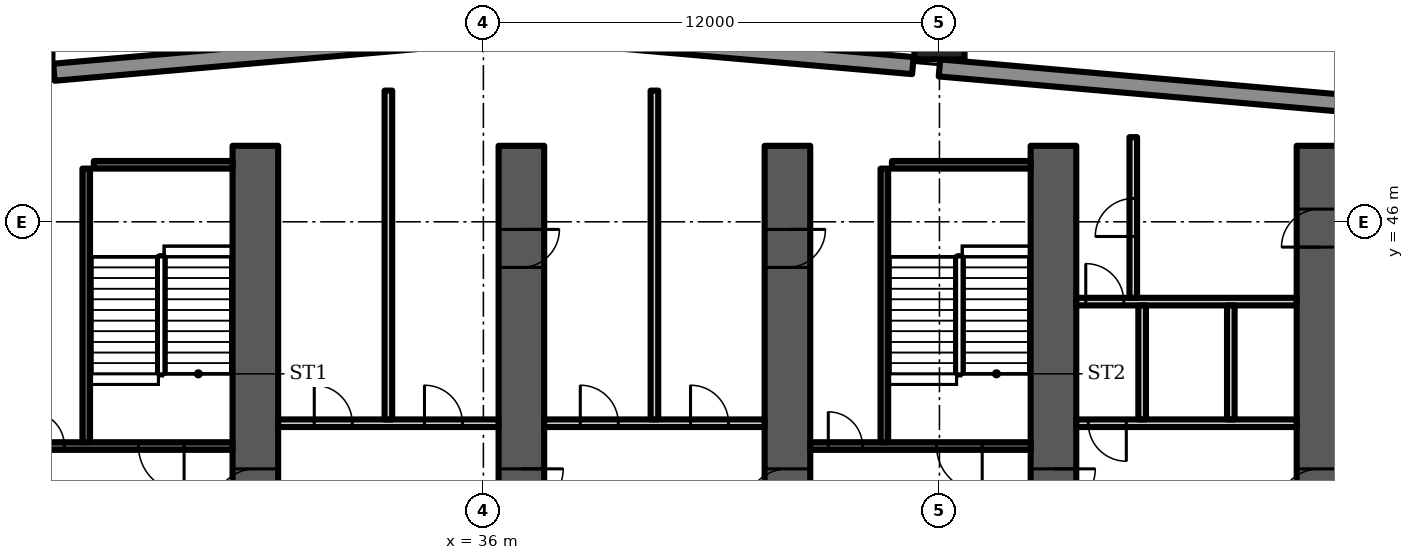
"""IFC4 building model, lengths in metres.
Left out: names, types, materials, properties, quantities, classifications, styles, units other than length and angle.
Written with IfcOpenShell. Run it as: python <this file> out.ifc"""

import sys

from ifc_helpers import new_model, si_unit, direction, frame, frame_2d, origin, origin_2d, place, context, subcontext, project, spatial, polyline, rectangle, outline, extrude, element, fill, save


model = new_model("IFC4")
c1 = context("Model", 3, precision=1e-05, world=origin(), true_north=direction((0.0, 1.0)))
c2 = subcontext(c1, "Body", "Model", "MODEL_VIEW")
j1 = project(units=[si_unit("LENGTHUNIT", "METRE"), si_unit("PLANEANGLEUNIT", "RADIAN")], contexts=[c1])
p1 = place(None, origin())
s1 = spatial("IfcSite", under=j1, at=p1, CompositionType="ELEMENT")
p2 = place(p1, origin())
s2 = spatial("IfcBuilding", under=s1, at=p2, CompositionType="ELEMENT")
p3 = place(p2, frame((0.0, 0.0, 33.0)))
s3 = spatial("IfcBuildingStorey", under=s2, at=p3, CompositionType="ELEMENT", Elevation=33.0)
for number, where, z_axis, x_axis in (
    (1, (24.0, 50.76, 0.0), (0.0, 0.0, 1.0), (1.0, 0.0, 0.0)),
    (2, (48.0, 50.935, 0.0), (0.0, 0.0, 1.0), (1.0, 0.0, 0.0)),
):
    element("IfcColumn", number, at=place(p3, frame(where, z_axis=z_axis, x_axis=x_axis)), inside=s3, PredefinedType="COLUMN", context=c2, shape_type="SweptSolid", body=[
        extrude(rectangle(XDim=1.32, YDim=1.32, at=origin_2d()), origin(), (0.0, 0.0, 1.0), 8.5),
    ])
p4 = place(p3, frame((59.301, 49.06, 0.0), z_axis=(0.0, 0.0, 1.0), x_axis=(-0.996195, 0.087145, 0.0)))
e3 = element("IfcWall", 3, at=p4, inside=s3, PredefinedType="SOLIDWALL", context=c2, shape_type="SweptSolid", body=[
    extrude(rectangle(XDim=11.344, YDim=0.45, at=frame_2d((5.672, 0.0))), origin(), (0.0, 0.0, 1.0), 8.1),
])
p5 = place(p3, frame((47.301, 50.11, 0.0), z_axis=(0.0, 0.0, 1.0), x_axis=(-0.996195, 0.087143, 0.0)))
e4 = element("IfcWall", 4, at=p5, inside=s3, PredefinedType="SOLIDWALL", context=c2, shape_type="SweptSolid", body=[
    extrude(rectangle(XDim=10.26, YDim=0.45, at=frame_2d((5.13, 0.0))), origin(), (0.0, 0.0, 1.0), 8.1),
])
p6 = place(p3, frame((36.0, 50.924, 0.0), z_axis=(0.0, 0.0, 1.0), x_axis=(-0.996195, -0.087145, 0.0)))
e5 = element("IfcWall", 5, at=p6, inside=s3, PredefinedType="SOLIDWALL", context=c2, shape_type="SweptSolid", body=[
    extrude(rectangle(XDim=11.344, YDim=0.45, at=frame_2d((5.672, 0.0))), origin(), (0.0, 0.0, 1.0), 8.1),
])
p7 = place(p3, frame((30.0, 35.2, 0.0), z_axis=(0.0, 0.0, 1.0), x_axis=(0.0, 1.0, 0.0)))
e6 = element("IfcWall", 6, at=p7, inside=s3, PredefinedType="SHEAR", context=c2, shape_type="SweptSolid", body=[
    extrude(rectangle(XDim=12.8, YDim=1.2, at=frame_2d((6.4, 0.0))), origin(), (0.0, 0.0, 1.0), 8.1),
])
p8 = place(p7, frame((3.2, 0.0, 0.0)))
e7 = element("IfcOpeningElement", 7, at=p8, cuts=e6, PredefinedType="OPENING", context=c2, shape_type="SweptSolid", body=[
    extrude(rectangle(XDim=1.1, YDim=2.1, at=frame_2d((0.55, 1.05))), frame((0.0, 0.61, 0.0), z_axis=(0.0, -1.0, 0.0), x_axis=(1.0, 0.0, 0.0)), (0.0, 0.0, 1.0), 1.22),
])
p9 = place(p3, frame((37.0, 35.2, 0.0), z_axis=(0.0, 0.0, 1.0), x_axis=(0.0, 1.0, 0.0)))
e8 = element("IfcWall", 8, at=p9, inside=s3, PredefinedType="SHEAR", context=c2, shape_type="SweptSolid", body=[
    extrude(rectangle(XDim=12.8, YDim=1.2, at=frame_2d((6.4, 0.0))), origin(), (0.0, 0.0, 1.0), 8.1),
])
p10 = place(p9, frame((3.2, 0.0, 0.0)))
e9 = element("IfcOpeningElement", 9, at=p10, cuts=e8, PredefinedType="OPENING", context=c2, shape_type="SweptSolid", body=[
    extrude(rectangle(XDim=1.1, YDim=2.1, at=frame_2d((0.55, 1.05))), frame((0.0, 0.61, 0.0), z_axis=(0.0, -1.0, 0.0), x_axis=(1.0, 0.0, 0.0)), (0.0, 0.0, 1.0), 1.22),
])
p11 = place(p9, frame((9.6, 0.0, 0.0)))
e10 = element("IfcOpeningElement", 10, at=p11, cuts=e8, PredefinedType="OPENING", context=c2, shape_type="SweptSolid", body=[
    extrude(rectangle(XDim=1.0, YDim=2.1, at=frame_2d((0.5, 1.05))), frame((0.0, 0.61, 0.0), z_axis=(0.0, -1.0, 0.0), x_axis=(1.0, 0.0, 0.0)), (0.0, 0.0, 1.0), 1.22),
])
p12 = place(p3, frame((44.0, 35.2, 0.0), z_axis=(0.0, 0.0, 1.0), x_axis=(0.0, 1.0, 0.0)))
e11 = element("IfcWall", 11, at=p12, inside=s3, PredefinedType="SHEAR", context=c2, shape_type="SweptSolid", body=[
    extrude(rectangle(XDim=12.8, YDim=1.2, at=frame_2d((6.4, 0.0))), origin(), (0.0, 0.0, 1.0), 8.1),
])
p13 = place(p12, frame((3.2, 0.0, 0.0)))
e12 = element("IfcOpeningElement", 12, at=p13, cuts=e11, PredefinedType="OPENING", context=c2, shape_type="SweptSolid", body=[
    extrude(rectangle(XDim=1.1, YDim=2.1, at=frame_2d((0.55, 1.05))), frame((0.0, 0.61, 0.0), z_axis=(0.0, -1.0, 0.0), x_axis=(1.0, 0.0, 0.0)), (0.0, 0.0, 1.0), 1.22),
])
p14 = place(p12, frame((9.6, 0.0, 0.0)))
e13 = element("IfcOpeningElement", 13, at=p14, cuts=e11, PredefinedType="OPENING", context=c2, shape_type="SweptSolid", body=[
    extrude(rectangle(XDim=1.0, YDim=2.1, at=frame_2d((0.5, 1.05))), frame((0.0, 0.61, 0.0), z_axis=(0.0, -1.0, 0.0), x_axis=(1.0, 0.0, 0.0)), (0.0, 0.0, 1.0), 1.22),
])
p15 = place(p3, frame((51.0, 35.2, 0.0), z_axis=(0.0, 0.0, 1.0), x_axis=(0.0, 1.0, 0.0)))
e14 = element("IfcWall", 14, at=p15, inside=s3, PredefinedType="SHEAR", context=c2, shape_type="SweptSolid", body=[
    extrude(rectangle(XDim=12.8, YDim=1.2, at=frame_2d((6.4, 0.0))), origin(), (0.0, 0.0, 1.0), 8.1),
])
p16 = place(p15, frame((3.2, 0.0, 0.0)))
e15 = element("IfcOpeningElement", 15, at=p16, cuts=e14, PredefinedType="OPENING", context=c2, shape_type="SweptSolid", body=[
    extrude(rectangle(XDim=1.1, YDim=2.1, at=frame_2d((0.55, 1.05))), frame((0.0, 0.61, 0.0), z_axis=(0.0, -1.0, 0.0), x_axis=(1.0, 0.0, 0.0)), (0.0, 0.0, 1.0), 1.22),
])
p17 = place(p3, frame((58.0, 35.2, 0.0), z_axis=(0.0, 0.0, 1.0), x_axis=(0.0, 1.0, 0.0)))
e16 = element("IfcWall", 16, at=p17, inside=s3, PredefinedType="SHEAR", context=c2, shape_type="SweptSolid", body=[
    extrude(rectangle(XDim=12.8, YDim=1.2, at=frame_2d((6.4, 0.0))), origin(), (0.0, 0.0, 1.0), 8.1),
])
p18 = place(p17, frame((10.134, 0.0, 0.0)))
e17 = element("IfcOpeningElement", 17, at=p18, cuts=e16, PredefinedType="OPENING", context=c2, shape_type="SweptSolid", body=[
    extrude(rectangle(XDim=1.0, YDim=2.1, at=frame_2d((0.5, 1.05))), frame((0.0, 0.61, 0.0), z_axis=(0.0, -1.0, 0.0), x_axis=(1.0, 0.0, 0.0)), (0.0, 0.0, 1.0), 1.22),
])
p19 = place(p17, frame((3.2, 0.0, 0.0)))
e18 = element("IfcOpeningElement", 18, at=p19, cuts=e16, PredefinedType="OPENING", context=c2, shape_type="SweptSolid", body=[
    extrude(rectangle(XDim=1.1, YDim=2.1, at=frame_2d((0.55, 1.05))), frame((0.0, 0.61, 0.0), z_axis=(0.0, -1.0, 0.0), x_axis=(1.0, 0.0, 0.0)), (0.0, 0.0, 1.0), 1.22),
])
p20 = place(p3, frame((23.6, 40.1, 0.0), z_axis=(0.0, 0.0, 1.0), x_axis=(1.0, 0.0, 0.0)))
e19 = element("IfcWall", 19, at=p20, inside=s3, PredefinedType="SHEAR", context=c2, shape_type="SweptSolid", body=[
    extrude(rectangle(XDim=5.8, YDim=0.2, at=frame_2d((2.9, 0.0))), origin(), (0.0, 0.0, 1.0), 8.1),
])
p21 = place(p20, frame((3.325, 0.0, 0.0)))
e20 = element("IfcOpeningElement", 20, at=p21, cuts=e19, PredefinedType="OPENING", context=c2, shape_type="SweptSolid", body=[
    extrude(rectangle(XDim=1.2, YDim=2.1, at=frame_2d((0.6, 1.05))), frame((0.0, 0.11, 0.0), z_axis=(0.0, -1.0, 0.0), x_axis=(1.0, 0.0, 0.0)), (0.0, 0.0, 1.0), 0.22),
])
p22 = place(p20, frame((0.475, 0.0, 0.0)))
e21 = element("IfcOpeningElement", 21, at=p22, cuts=e19, PredefinedType="OPENING", context=c2, shape_type="SweptSolid", body=[
    extrude(rectangle(XDim=0.9, YDim=2.1, at=frame_2d((0.45, 1.05))), frame((0.0, 0.11, 0.0), z_axis=(0.0, -1.0, 0.0), x_axis=(1.0, 0.0, 0.0)), (0.0, 0.0, 1.0), 0.22),
])
p23 = place(p3, frame((25.55, 40.2, 0.0), z_axis=(0.0, 0.0, 1.0), x_axis=(0.0, 1.0, 0.0)))
e22 = element("IfcWall", 22, at=p23, inside=s3, PredefinedType="SHEAR", context=c2, shape_type="SweptSolid", body=[
    extrude(rectangle(XDim=7.2, YDim=0.2, at=frame_2d((3.6, 0.0))), origin(), (0.0, 0.0, 1.0), 8.1),
])
p24 = place(p3, frame((25.75, 47.5, 0.0), z_axis=(0.0, 0.0, 1.0), x_axis=(1.0, 0.0, 0.0)))
e23 = element("IfcWall", 23, at=p24, inside=s3, PredefinedType="SHEAR", context=c2, shape_type="SweptSolid", body=[
    extrude(rectangle(XDim=3.65, YDim=0.2, at=frame_2d((1.825, 0.0))), origin(), (0.0, 0.0, 1.0), 8.1),
])
p25 = place(p3, frame((30.6, 40.7, 0.0), z_axis=(0.0, 0.0, 1.0), x_axis=(1.0, 0.0, 0.0)))
e24 = element("IfcWall", 24, at=p25, inside=s3, PredefinedType="PARTITIONING", context=c2, shape_type="SweptSolid", body=[
    extrude(rectangle(XDim=5.8, YDim=0.2, at=frame_2d((2.9, 0.0))), origin(), (0.0, 0.0, 1.0), 8.1),
])
p26 = place(p25, frame((0.95, 0.0, 0.0)))
e25 = element("IfcOpeningElement", 25, at=p26, cuts=e24, PredefinedType="OPENING", context=c2, shape_type="SweptSolid", body=[
    extrude(rectangle(XDim=1.0, YDim=2.1, at=frame_2d((0.5, 1.05))), frame((0.0, 0.11, 0.0), z_axis=(0.0, -1.0, 0.0), x_axis=(1.0, 0.0, 0.0)), (0.0, 0.0, 1.0), 0.22),
])
p27 = place(p25, frame((3.85, 0.0, 0.0)))
e26 = element("IfcOpeningElement", 26, at=p27, cuts=e24, PredefinedType="OPENING", context=c2, shape_type="SweptSolid", body=[
    extrude(rectangle(XDim=1.0, YDim=2.1, at=frame_2d((0.5, 1.05))), frame((0.0, 0.11, 0.0), z_axis=(0.0, -1.0, 0.0), x_axis=(1.0, 0.0, 0.0)), (0.0, 0.0, 1.0), 0.22),
])
p28 = place(p3, frame((33.5, 40.8, 0.0), z_axis=(0.0, 0.0, 1.0), x_axis=(0.0, 1.0, 0.0)))
e27 = element("IfcWall", 27, at=p28, inside=s3, PredefinedType="PARTITIONING", context=c2, shape_type="SweptSolid", body=[
    extrude(rectangle(XDim=8.653, YDim=0.2, at=frame_2d((4.326, 0.0))), origin(), (0.0, 0.0, 1.0), 8.1),
])
p29 = place(p3, frame((37.6, 40.7, 0.0), z_axis=(0.0, 0.0, 1.0), x_axis=(1.0, 0.0, 0.0)))
e28 = element("IfcWall", 28, at=p29, inside=s3, PredefinedType="PARTITIONING", context=c2, shape_type="SweptSolid", body=[
    extrude(rectangle(XDim=5.8, YDim=0.2, at=frame_2d((2.9, 0.0))), origin(), (0.0, 0.0, 1.0), 8.1),
])
p30 = place(p29, frame((0.95, 0.0, 0.0)))
e29 = element("IfcOpeningElement", 29, at=p30, cuts=e28, PredefinedType="OPENING", context=c2, shape_type="SweptSolid", body=[
    extrude(rectangle(XDim=1.0, YDim=2.1, at=frame_2d((0.5, 1.05))), frame((0.0, 0.11, 0.0), z_axis=(0.0, -1.0, 0.0), x_axis=(1.0, 0.0, 0.0)), (0.0, 0.0, 1.0), 0.22),
])
p31 = place(p29, frame((3.85, 0.0, 0.0)))
e30 = element("IfcOpeningElement", 30, at=p31, cuts=e28, PredefinedType="OPENING", context=c2, shape_type="SweptSolid", body=[
    extrude(rectangle(XDim=1.0, YDim=2.1, at=frame_2d((0.5, 1.05))), frame((0.0, 0.11, 0.0), z_axis=(0.0, -1.0, 0.0), x_axis=(1.0, 0.0, 0.0)), (0.0, 0.0, 1.0), 0.22),
])
p32 = place(p3, frame((40.5, 40.8, 0.0), z_axis=(0.0, 0.0, 1.0), x_axis=(0.0, 1.0, 0.0)))
e31 = element("IfcWall", 31, at=p32, inside=s3, PredefinedType="PARTITIONING", context=c2, shape_type="SweptSolid", body=[
    extrude(rectangle(XDim=8.653, YDim=0.2, at=frame_2d((4.326, 0.0))), origin(), (0.0, 0.0, 1.0), 8.1),
])
p33 = place(p3, frame((44.6, 40.1, 0.0), z_axis=(0.0, 0.0, 1.0), x_axis=(1.0, 0.0, 0.0)))
e32 = element("IfcWall", 32, at=p33, inside=s3, PredefinedType="SHEAR", context=c2, shape_type="SweptSolid", body=[
    extrude(rectangle(XDim=5.8, YDim=0.2, at=frame_2d((2.9, 0.0))), origin(), (0.0, 0.0, 1.0), 8.1),
])
p34 = place(p33, frame((3.325, 0.0, 0.0)))
e33 = element("IfcOpeningElement", 33, at=p34, cuts=e32, PredefinedType="OPENING", context=c2, shape_type="SweptSolid", body=[
    extrude(rectangle(XDim=1.2, YDim=2.1, at=frame_2d((0.6, 1.05))), frame((0.0, 0.11, 0.0), z_axis=(0.0, -1.0, 0.0), x_axis=(1.0, 0.0, 0.0)), (0.0, 0.0, 1.0), 0.22),
])
p35 = place(p33, frame((0.475, 0.0, 0.0)))
e34 = element("IfcOpeningElement", 34, at=p35, cuts=e32, PredefinedType="OPENING", context=c2, shape_type="SweptSolid", body=[
    extrude(rectangle(XDim=0.9, YDim=2.1, at=frame_2d((0.45, 1.05))), frame((0.0, 0.11, 0.0), z_axis=(0.0, -1.0, 0.0), x_axis=(1.0, 0.0, 0.0)), (0.0, 0.0, 1.0), 0.22),
])
p36 = place(p3, frame((46.55, 40.2, 0.0), z_axis=(0.0, 0.0, 1.0), x_axis=(0.0, 1.0, 0.0)))
e35 = element("IfcWall", 35, at=p36, inside=s3, PredefinedType="SHEAR", context=c2, shape_type="SweptSolid", body=[
    extrude(rectangle(XDim=7.2, YDim=0.2, at=frame_2d((3.6, 0.0))), origin(), (0.0, 0.0, 1.0), 8.1),
])
p37 = place(p3, frame((46.75, 47.5, 0.0), z_axis=(0.0, 0.0, 1.0), x_axis=(1.0, 0.0, 0.0)))
e36 = element("IfcWall", 36, at=p37, inside=s3, PredefinedType="SHEAR", context=c2, shape_type="SweptSolid", body=[
    extrude(rectangle(XDim=3.65, YDim=0.2, at=frame_2d((1.825, 0.0))), origin(), (0.0, 0.0, 1.0), 8.1),
])
p38 = place(p3, frame((51.6, 40.7, 0.0), z_axis=(0.0, 0.0, 1.0), x_axis=(1.0, 0.0, 0.0)))
e37 = element("IfcWall", 37, at=p38, inside=s3, PredefinedType="PARTITIONING", context=c2, shape_type="SweptSolid", body=[
    extrude(rectangle(XDim=5.8, YDim=0.2, at=frame_2d((2.9, 0.0))), origin(), (0.0, 0.0, 1.0), 8.1),
])
p39 = place(p38, frame((0.317, 0.0, 0.0)))
e38 = element("IfcOpeningElement", 38, at=p39, cuts=e37, PredefinedType="OPENING", context=c2, shape_type="SweptSolid", body=[
    extrude(rectangle(XDim=1.0, YDim=2.1, at=frame_2d((0.5, 1.05))), frame((0.0, 0.11, 0.0), z_axis=(0.0, -1.0, 0.0), x_axis=(1.0, 0.0, 0.0)), (0.0, 0.0, 1.0), 0.22),
])
p40 = place(p3, frame((51.6, 43.9, 0.0), z_axis=(0.0, 0.0, 1.0), x_axis=(1.0, 0.0, 0.0)))
e39 = element("IfcWall", 39, at=p40, inside=s3, PredefinedType="PARTITIONING", context=c2, shape_type="SweptSolid", body=[
    extrude(rectangle(XDim=5.8, YDim=0.2, at=frame_2d((2.9, 0.0))), origin(), (0.0, 0.0, 1.0), 8.1),
])
p41 = place(p40, frame((0.25, 0.0, 0.0)))
e40 = element("IfcOpeningElement", 40, at=p41, cuts=e39, PredefinedType="OPENING", context=c2, shape_type="SweptSolid", body=[
    extrude(rectangle(XDim=1.0, YDim=2.1, at=frame_2d((0.5, 1.05))), frame((0.0, 0.11, 0.0), z_axis=(0.0, -1.0, 0.0), x_axis=(1.0, 0.0, 0.0)), (0.0, 0.0, 1.0), 0.22),
])
p42 = place(p3, origin())
e41 = element("IfcWall", 41, at=p42, inside=s3, PredefinedType="PARTITIONING", context=c2, shape_type="SweptSolid", body=[
    extrude(outline(polyline([(53.233, 40.8), (53.233, 43.8), (53.433, 43.8), (53.433, 40.8), (53.233, 40.8)])), origin(), (0.0, 0.0, 1.0), 8.1),
])
p43 = place(p3, origin())
e42 = element("IfcWall", 42, at=p43, inside=s3, PredefinedType="PARTITIONING", context=c2, shape_type="SweptSolid", body=[
    extrude(outline(polyline([(55.567, 40.8), (55.567, 43.8), (55.767, 43.8), (55.767, 40.8), (55.567, 40.8)])), origin(), (0.0, 0.0, 1.0), 8.1),
])
p44 = place(p3, frame((53.1, 44.0, 0.0), z_axis=(0.0, 0.0, 1.0), x_axis=(0.0, 1.0, 0.0)))
e43 = element("IfcWall", 43, at=p44, inside=s3, PredefinedType="PARTITIONING", context=c2, shape_type="SweptSolid", body=[
    extrude(rectangle(XDim=4.228, YDim=0.2, at=frame_2d((2.114, 0.0))), origin(), (0.0, 0.0, 1.0), 8.1),
])
p45 = place(p44, frame((1.614, 0.0, 0.0)))
e44 = element("IfcOpeningElement", 44, at=p45, cuts=e43, PredefinedType="OPENING", context=c2, shape_type="SweptSolid", body=[
    extrude(rectangle(XDim=1.0, YDim=2.1, at=frame_2d((0.5, 1.05))), frame((0.0, 0.11, 0.0), z_axis=(0.0, -1.0, 0.0), x_axis=(1.0, 0.0, 0.0)), (0.0, 0.0, 1.0), 0.22),
])
p46 = place(p21, origin())
e45 = element("IfcDoor", 45, at=p46, inside=s3, OperationType="SINGLE_SWING_RIGHT", PredefinedType="DOOR", context=c2, shape_type="SweptSolid", body=[
    extrude(rectangle(XDim=1.2, YDim=2.1, at=frame_2d((0.6, 1.05))), frame((0.0, 0.025, 0.0), z_axis=(0.0, -1.0, 0.0), x_axis=(1.0, 0.0, 0.0)), (0.0, 0.0, 1.0), 0.05),
])
fill(e20, e45)
p47 = place(p22, origin())
e46 = element("IfcDoor", 46, at=p47, inside=s3, OperationType="SINGLE_SWING_LEFT", PredefinedType="DOOR", context=c2, shape_type="SweptSolid", body=[
    extrude(rectangle(XDim=0.9, YDim=2.1, at=frame_2d((0.45, 1.05))), frame((0.0, 0.025, 0.0), z_axis=(0.0, -1.0, 0.0), x_axis=(1.0, 0.0, 0.0)), (0.0, 0.0, 1.0), 0.05),
])
fill(e21, e46)
p48 = place(p26, origin())
e47 = element("IfcDoor", 47, at=p48, inside=s3, OperationType="SINGLE_SWING_LEFT", PredefinedType="DOOR", context=c2, shape_type="SweptSolid", body=[
    extrude(rectangle(XDim=1.0, YDim=2.1, at=frame_2d((0.5, 1.05))), frame((0.0, 0.025, 0.0), z_axis=(0.0, -1.0, 0.0), x_axis=(1.0, 0.0, 0.0)), (0.0, 0.0, 1.0), 0.05),
])
fill(e25, e47)
p49 = place(p27, origin())
e48 = element("IfcDoor", 48, at=p49, inside=s3, OperationType="SINGLE_SWING_LEFT", PredefinedType="DOOR", context=c2, shape_type="SweptSolid", body=[
    extrude(rectangle(XDim=1.0, YDim=2.1, at=frame_2d((0.5, 1.05))), frame((0.0, 0.025, 0.0), z_axis=(0.0, -1.0, 0.0), x_axis=(1.0, 0.0, 0.0)), (0.0, 0.0, 1.0), 0.05),
])
fill(e26, e48)
p50 = place(p30, origin())
e49 = element("IfcDoor", 49, at=p50, inside=s3, OperationType="SINGLE_SWING_LEFT", PredefinedType="DOOR", context=c2, shape_type="SweptSolid", body=[
    extrude(rectangle(XDim=1.0, YDim=2.1, at=frame_2d((0.5, 1.05))), frame((0.0, 0.025, 0.0), z_axis=(0.0, -1.0, 0.0), x_axis=(1.0, 0.0, 0.0)), (0.0, 0.0, 1.0), 0.05),
])
fill(e29, e49)
p51 = place(p31, origin())
e50 = element("IfcDoor", 50, at=p51, inside=s3, OperationType="SINGLE_SWING_LEFT", PredefinedType="DOOR", context=c2, shape_type="SweptSolid", body=[
    extrude(rectangle(XDim=1.0, YDim=2.1, at=frame_2d((0.5, 1.05))), frame((0.0, 0.025, 0.0), z_axis=(0.0, -1.0, 0.0), x_axis=(1.0, 0.0, 0.0)), (0.0, 0.0, 1.0), 0.05),
])
fill(e30, e50)
p52 = place(p34, origin())
e51 = element("IfcDoor", 51, at=p52, inside=s3, OperationType="SINGLE_SWING_RIGHT", PredefinedType="DOOR", context=c2, shape_type="SweptSolid", body=[
    extrude(rectangle(XDim=1.2, YDim=2.1, at=frame_2d((0.6, 1.05))), frame((0.0, 0.025, 0.0), z_axis=(0.0, -1.0, 0.0), x_axis=(1.0, 0.0, 0.0)), (0.0, 0.0, 1.0), 0.05),
])
fill(e33, e51)
p53 = place(p35, origin())
e52 = element("IfcDoor", 52, at=p53, inside=s3, OperationType="SINGLE_SWING_LEFT", PredefinedType="DOOR", context=c2, shape_type="SweptSolid", body=[
    extrude(rectangle(XDim=0.9, YDim=2.1, at=frame_2d((0.45, 1.05))), frame((0.0, 0.025, 0.0), z_axis=(0.0, -1.0, 0.0), x_axis=(1.0, 0.0, 0.0)), (0.0, 0.0, 1.0), 0.05),
])
fill(e34, e52)
p54 = place(p39, origin())
e53 = element("IfcDoor", 53, at=p54, inside=s3, OperationType="SINGLE_SWING_RIGHT", PredefinedType="DOOR", context=c2, shape_type="SweptSolid", body=[
    extrude(rectangle(XDim=1.0, YDim=2.1, at=frame_2d((0.5, 1.05))), frame((0.0, 0.025, 0.0), z_axis=(0.0, -1.0, 0.0), x_axis=(1.0, 0.0, 0.0)), (0.0, 0.0, 1.0), 0.05),
])
fill(e38, e53)
p55 = place(p41, origin())
e54 = element("IfcDoor", 54, at=p55, inside=s3, OperationType="SINGLE_SWING_LEFT", PredefinedType="DOOR", context=c2, shape_type="SweptSolid", body=[
    extrude(rectangle(XDim=1.0, YDim=2.1, at=frame_2d((0.5, 1.05))), frame((0.0, 0.025, 0.0), z_axis=(0.0, -1.0, 0.0), x_axis=(1.0, 0.0, 0.0)), (0.0, 0.0, 1.0), 0.05),
])
fill(e40, e54)
p56 = place(p45, origin())
e55 = element("IfcDoor", 55, at=p56, inside=s3, OperationType="SINGLE_SWING_LEFT", PredefinedType="DOOR", context=c2, shape_type="SweptSolid", body=[
    extrude(rectangle(XDim=1.0, YDim=2.1, at=frame_2d((0.5, 1.05))), frame((0.0, 0.025, 0.0), z_axis=(0.0, -1.0, 0.0), x_axis=(1.0, 0.0, 0.0)), (0.0, 0.0, 1.0), 0.05),
])
fill(e44, e55)
p57 = place(p18, origin())
e56 = element("IfcDoor", 56, at=p57, inside=s3, OperationType="SINGLE_SWING_LEFT", PredefinedType="DOOR", context=c2, shape_type="SweptSolid", body=[
    extrude(rectangle(XDim=1.0, YDim=2.1, at=frame_2d((0.5, 1.05))), frame((0.0, 0.6, 0.0), z_axis=(0.0, -1.0, 0.0), x_axis=(1.0, 0.0, 0.0)), (0.0, 0.0, 1.0), 1.199),
])
fill(e17, e56)
p58 = place(p8, origin())
e57 = element("IfcDoor", 57, at=p58, inside=s3, OperationType="SINGLE_SWING_LEFT", PredefinedType="DOOR", context=c2, shape_type="SweptSolid", body=[
    extrude(rectangle(XDim=1.1, YDim=2.1, at=frame_2d((0.55, 1.05))), frame((0.0, 0.025, 0.0), z_axis=(0.0, -1.0, 0.0), x_axis=(1.0, 0.0, 0.0)), (0.0, 0.0, 1.0), 0.05),
])
fill(e7, e57)
p59 = place(p10, origin())
e58 = element("IfcDoor", 58, at=p59, inside=s3, OperationType="SINGLE_SWING_RIGHT", PredefinedType="DOOR", context=c2, shape_type="SweptSolid", body=[
    extrude(rectangle(XDim=1.1, YDim=2.1, at=frame_2d((0.55, 1.05))), frame((0.0, 0.025, 0.0), z_axis=(0.0, -1.0, 0.0), x_axis=(1.0, 0.0, 0.0)), (0.0, 0.0, 1.0), 0.05),
])
fill(e9, e58)
p60 = place(p11, origin())
e59 = element("IfcDoor", 59, at=p60, inside=s3, OperationType="SINGLE_SWING_RIGHT", PredefinedType="DOOR", context=c2, shape_type="SweptSolid", body=[
    extrude(rectangle(XDim=1.0, YDim=2.1, at=frame_2d((0.5, 1.05))), frame((0.0, 0.6, 0.0), z_axis=(0.0, -1.0, 0.0), x_axis=(1.0, 0.0, 0.0)), (0.0, 0.0, 1.0), 1.199),
])
fill(e10, e59)
p61 = place(p13, origin())
e60 = element("IfcDoor", 60, at=p61, inside=s3, OperationType="SINGLE_SWING_LEFT", PredefinedType="DOOR", context=c2, shape_type="SweptSolid", body=[
    extrude(rectangle(XDim=1.1, YDim=2.1, at=frame_2d((0.55, 1.05))), frame((0.0, 0.025, 0.0), z_axis=(0.0, -1.0, 0.0), x_axis=(1.0, 0.0, 0.0)), (0.0, 0.0, 1.0), 0.05),
])
fill(e12, e60)
p62 = place(p14, origin())
e61 = element("IfcDoor", 61, at=p62, inside=s3, OperationType="SINGLE_SWING_RIGHT", PredefinedType="DOOR", context=c2, shape_type="SweptSolid", body=[
    extrude(rectangle(XDim=1.0, YDim=2.1, at=frame_2d((0.5, 1.05))), frame((0.0, 0.6, 0.0), z_axis=(0.0, -1.0, 0.0), x_axis=(1.0, 0.0, 0.0)), (0.0, 0.0, 1.0), 1.199),
])
fill(e13, e61)
p63 = place(p16, origin())
e62 = element("IfcDoor", 62, at=p63, inside=s3, OperationType="SINGLE_SWING_RIGHT", PredefinedType="DOOR", context=c2, shape_type="SweptSolid", body=[
    extrude(rectangle(XDim=1.1, YDim=2.1, at=frame_2d((0.55, 1.05))), frame((0.0, 0.025, 0.0), z_axis=(0.0, -1.0, 0.0), x_axis=(1.0, 0.0, 0.0)), (0.0, 0.0, 1.0), 0.05),
])
fill(e15, e62)
p64 = place(p19, origin())
e63 = element("IfcDoor", 63, at=p64, inside=s3, OperationType="SINGLE_SWING_LEFT", PredefinedType="DOOR", context=c2, shape_type="SweptSolid", body=[
    extrude(rectangle(XDim=1.1, YDim=2.1, at=frame_2d((0.55, 1.05))), frame((0.0, 0.025, 0.0), z_axis=(0.0, -1.0, 0.0), x_axis=(1.0, 0.0, 0.0)), (0.0, 0.0, 1.0), 0.05),
])
fill(e18, e63)
save(model, sys.argv[1])
